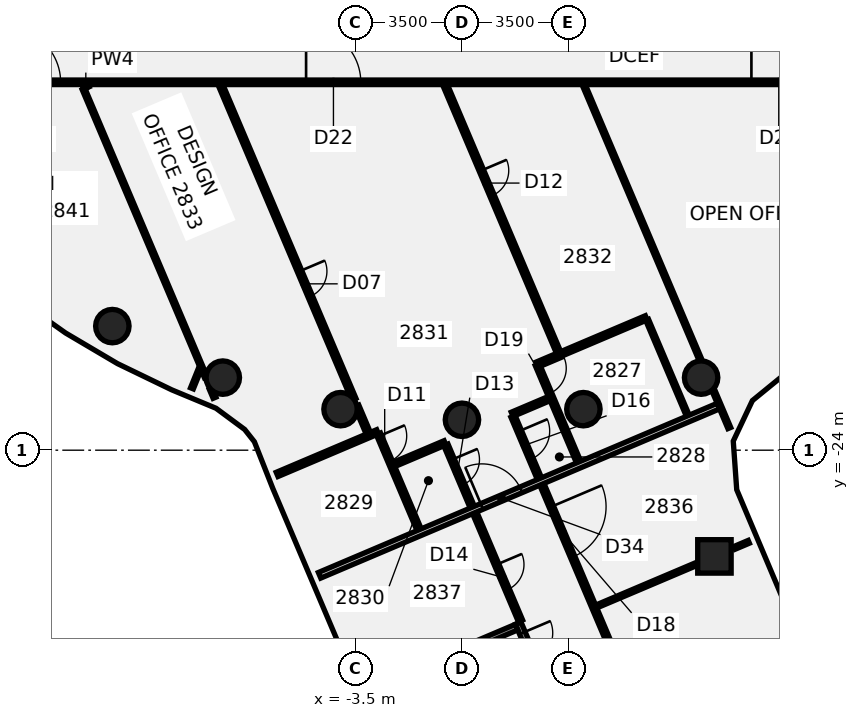
"""IFC4 building model, lengths in metres.
Left out: names, types, materials, properties, quantities, classifications, styles, units other than length and angle.
Written with IfcOpenShell. Run it as: python <this file> out.ifc"""

import sys

from ifc_helpers import new_model, si_unit, direction, frame, frame_2d, origin, origin_2d, place, context, subcontext, project, spatial, rectangle, circle, extrude, element, fill, save


model = new_model("IFC4")
c1 = context("Model", 3, precision=1e-05, world=origin(), true_north=direction((0.0, 1.0)))
c2 = subcontext(c1, "Body", "Model", "MODEL_VIEW")
j1 = project(units=[si_unit("LENGTHUNIT", "METRE"), si_unit("PLANEANGLEUNIT", "RADIAN")], contexts=[c1])
p1 = place(None, origin())
s1 = spatial("IfcSite", under=j1, at=p1, CompositionType="ELEMENT")
p2 = place(p1, origin())
s2 = spatial("IfcBuilding", under=s1, at=p2, CompositionType="ELEMENT")
p3 = place(p2, frame((0.0, 0.0, 117.25)))
s3 = spatial("IfcBuildingStorey", under=s2, at=p3, CompositionType="ELEMENT", Elevation=117.25)
for number, where, z_axis, x_axis in (
    (1, (-11.5, -19.919, -0.14), (0.0, 0.0, 1.0), (1.0, 0.0, 0.0)),
    (2, (-7.866, -21.613, -0.14), (0.0, 0.0, 1.0), (1.0, 0.0, 0.0)),
    (3, (-3.994, -22.651, -0.14), (0.0, 0.0, 1.0), (1.0, 0.0, 0.0)),
    (4, (0.0, -23.0, -0.14), (0.0, 0.0, 1.0), (1.0, 0.0, 0.0)),
    (5, (3.994, -22.651, -0.14), (0.0, 0.0, 1.0), (1.0, 0.0, 0.0)),
    (6, (7.866, -21.613, -0.14), (0.0, 0.0, 1.0), (1.0, 0.0, 0.0)),
):
    element("IfcColumn", number, at=place(p3, frame(where, z_axis=z_axis, x_axis=x_axis)), inside=s3, PredefinedType="COLUMN", context=c2, shape_type="SweptSolid", body=[
        extrude(circle(Radius=0.55, at=origin_2d()), origin(), (0.0, 0.0, 1.0), 3.75),
    ])
p4 = place(p3, frame((8.304, -27.493, -0.139), z_axis=(0.026355217637, 0.040541482933, 0.998830211129), x_axis=(-0.920521070145, -0.388633376935, 0.040063172014)))
e7 = element("IfcColumn", 7, at=p4, inside=s3, PredefinedType="COLUMN", context=c2, shape_type="SweptSolid", body=[
    extrude(rectangle(XDim=1.1, YDim=1.1, at=origin_2d()), origin(), (0.0, 0.0, 1.0), 3.752),
])
p5 = place(p3, frame((-12.445, -12.125, 0.0), z_axis=(0.0, 0.0, 1.0), x_axis=(0.390522443432, -0.920593407089, 0.0)))
e8 = element("IfcWall", 8, at=p5, inside=s3, PredefinedType="PARTITIONING", context=c2, shape_type="SweptSolid", body=[
    extrude(rectangle(XDim=10.296, YDim=0.1, at=frame_2d((5.148, 0.0))), origin(), (0.0, 0.0, 1.0), 3.01),
])
p6 = place(p3, frame((-8.264, -21.981, 0.0), z_axis=(0.0, 0.0, 1.0), x_axis=(0.390412497886, -0.920640039046, 0.0)))
e9 = element("IfcWall", 9, at=p6, inside=s3, PredefinedType="PARTITIONING", context=c2, shape_type="SweptSolid", body=[
    extrude(rectangle(XDim=0.32, YDim=0.1, at=frame_2d((0.16, 0.0))), origin(), (0.0, 0.0, 1.0), 3.01),
])
p7 = place(p3, frame((-7.94, -11.988, 0.0), z_axis=(0.0, 0.0, 1.0), x_axis=(0.390462727609, -0.920618736692, 0.0)))
e10 = element("IfcWall", 10, at=p7, inside=s3, PredefinedType="PARTITIONING", context=c2, shape_type="SweptSolid", body=[
    extrude(rectangle(XDim=11.227, YDim=0.15, at=frame_2d((5.614, 0.0))), origin(), (0.0, 0.0, 1.0), 3.01),
])
p8 = place(p7, frame((6.655, 0.0, 0.0)))
e11 = element("IfcOpeningElement", 11, at=p8, cuts=e10, PredefinedType="OPENING", context=c2, shape_type="SweptSolid", body=[
    extrude(rectangle(XDim=0.9, YDim=2.1, at=frame_2d((0.45, 1.05))), frame((0.0, 0.085, 0.0), z_axis=(0.0, -1.0, 0.0), x_axis=(1.0, 0.0, 0.0)), (0.0, 0.0, 1.0), 0.17),
])
p9 = place(p3, frame((-3.462, -22.545, 0.0), z_axis=(0.0, 0.0, 1.0), x_axis=(0.390504875404, -0.920600859377, 0.0)))
e12 = element("IfcWall", 12, at=p9, inside=s3, PredefinedType="PARTITIONING", context=c2, shape_type="SweptSolid", body=[
    extrude(rectangle(XDim=0.976, YDim=0.15, at=frame_2d((0.488, 0.0))), origin(), (0.0, 0.0, 1.0), 3.01),
])
p10 = place(p3, frame((-2.747, -23.464, 0.0), z_axis=(0.0, 0.0, 1.0), x_axis=(0.390509570778, -0.920598867657, 0.0)))
e13 = element("IfcWall", 13, at=p10, inside=s3, PredefinedType="PARTITIONING", context=c2, shape_type="SweptSolid", body=[
    extrude(rectangle(XDim=3.425, YDim=0.15, at=frame_2d((1.712, 0.0))), origin(), (0.0, 0.0, 1.0), 3.01),
])
p11 = place(p10, frame((0.075, 0.0, 0.0)))
e14 = element("IfcOpeningElement", 14, at=p11, cuts=e13, PredefinedType="OPENING", context=c2, shape_type="SweptSolid", body=[
    extrude(rectangle(XDim=0.9, YDim=2.1, at=frame_2d((0.45, 1.05))), frame((0.0, 0.085, 0.0), z_axis=(0.0, -1.0, 0.0), x_axis=(1.0, 0.0, 0.0)), (0.0, 0.0, 1.0), 0.17),
])
p12 = place(p3, frame((-0.554, -11.988, 0.0), z_axis=(0.0, 0.0, 1.0), x_axis=(0.390471755415, -0.920614907669, 0.0)))
e15 = element("IfcWall", 15, at=p12, inside=s3, PredefinedType="PARTITIONING", context=c2, shape_type="SweptSolid", body=[
    extrude(rectangle(XDim=9.554, YDim=0.15, at=frame_2d((4.777, 0.0))), origin(), (0.0, 0.0, 1.0), 3.01),
])
p13 = place(p12, frame((3.055, 0.0, 0.0)))
e16 = element("IfcOpeningElement", 16, at=p13, cuts=e15, PredefinedType="OPENING", context=c2, shape_type="SweptSolid", body=[
    extrude(rectangle(XDim=0.9, YDim=2.1, at=frame_2d((0.45, 1.05))), frame((0.0, 0.085, 0.0), z_axis=(0.0, -1.0, 0.0), x_axis=(1.0, 0.0, 0.0)), (0.0, 0.0, 1.0), 0.17),
])
p14 = place(p3, frame((-0.529, -23.826, 0.0), z_axis=(0.0, 0.0, 1.0), x_axis=(0.390377283155, -0.920654971635, 0.0)))
e17 = element("IfcWall", 17, at=p14, inside=s3, PredefinedType="PARTITIONING", context=c2, shape_type="SweptSolid", body=[
    extrude(rectangle(XDim=6.286, YDim=0.15, at=frame_2d((3.143, 0.0))), origin(), (0.0, 0.0, 1.0), 3.01),
])
p15 = place(p14, frame((0.525, 0.0, 0.0)))
e18 = element("IfcOpeningElement", 18, at=p15, cuts=e17, PredefinedType="OPENING", context=c2, shape_type="SweptSolid", body=[
    extrude(rectangle(XDim=0.9, YDim=2.1, at=frame_2d((0.45, 1.05))), frame((0.0, 0.085, 0.0), z_axis=(0.0, -1.0, 0.0), x_axis=(1.0, 0.0, 0.0)), (0.0, 0.0, 1.0), 0.17),
])
p16 = place(p14, frame((4.275, 0.0, 0.0)))
e19 = element("IfcOpeningElement", 19, at=p16, cuts=e17, PredefinedType="OPENING", context=c2, shape_type="SweptSolid", body=[
    extrude(rectangle(XDim=0.9, YDim=2.1, at=frame_2d((0.45, 1.05))), frame((0.0, 0.085, 0.0), z_axis=(0.0, -1.0, 0.0), x_axis=(1.0, 0.0, 0.0)), (0.0, 0.0, 1.0), 0.17),
])
p17 = place(p3, frame((1.68, -22.889, 0.0), z_axis=(0.0, 0.0, 1.0), x_axis=(0.390687971065, -0.920523171498, 0.0)))
e20 = element("IfcWall", 20, at=p17, inside=s3, PredefinedType="PARTITIONING", context=c2, shape_type="SweptSolid", body=[
    extrude(rectangle(XDim=15.75, YDim=0.15, at=frame_2d((7.875, 0.0))), origin(), (0.0, 0.0, 1.0), 3.01),
])
p18 = place(p17, frame((0.525, 0.0, 0.0)))
e21 = element("IfcOpeningElement", 21, at=p18, cuts=e20, PredefinedType="OPENING", context=c2, shape_type="SweptSolid", body=[
    extrude(rectangle(XDim=1.0, YDim=2.1, at=frame_2d((0.5, 1.05))), frame((0.0, 0.085, 0.0), z_axis=(0.0, -1.0, 0.0), x_axis=(1.0, 0.0, 0.0)), (0.0, 0.0, 1.0), 0.17),
])
p19 = place(p17, frame((12.075, 0.0, 0.0)))
e22 = element("IfcOpeningElement", 22, at=p19, cuts=e20, PredefinedType="OPENING", context=c2, shape_type="SweptSolid", body=[
    extrude(rectangle(XDim=0.9, YDim=2.1, at=frame_2d((0.45, 1.05))), frame((0.0, 0.085, 0.0), z_axis=(0.0, -1.0, 0.0), x_axis=(1.0, 0.0, 0.0)), (0.0, 0.0, 1.0), 0.17),
])
p20 = place(p17, frame((3.226, 0.0, 0.0)))
e23 = element("IfcOpeningElement", 23, at=p20, cuts=e20, PredefinedType="OPENING", context=c2, shape_type="SweptSolid", body=[
    extrude(rectangle(XDim=1.8, YDim=2.1, at=frame_2d((0.9, 1.05))), frame((0.0, 0.085, 0.0), z_axis=(0.0, -1.0, 0.0), x_axis=(1.0, 0.0, 0.0)), (0.0, 0.0, 1.0), 0.17),
])
p21 = place(p3, frame((2.48, -21.188, 0.0), z_axis=(0.0, 0.0, 1.0), x_axis=(0.390054258105, -0.920791874277, 0.0)))
e24 = element("IfcWall", 24, at=p21, inside=s3, PredefinedType="PARTITIONING", context=c2, shape_type="SweptSolid", body=[
    extrude(rectangle(XDim=3.479, YDim=0.15, at=frame_2d((1.74, 0.0))), origin(), (0.0, 0.0, 1.0), 3.01),
])
p22 = place(p21, frame((0.13, 0.0, 0.0)))
e25 = element("IfcOpeningElement", 25, at=p22, cuts=e24, PredefinedType="OPENING", context=c2, shape_type="SweptSolid", body=[
    extrude(rectangle(XDim=0.9, YDim=2.1, at=frame_2d((0.45, 1.05))), frame((0.0, 0.085, 0.0), z_axis=(0.0, -1.0, 0.0), x_axis=(1.0, 0.0, 0.0)), (0.0, 0.0, 1.0), 0.17),
])
p23 = place(p3, frame((4.004, -11.978, 0.0), z_axis=(0.0, 0.0, 1.0), x_axis=(0.390495164952, -0.920604978342, 0.0)))
e26 = element("IfcWall", 26, at=p23, inside=s3, PredefinedType="PARTITIONING", context=c2, shape_type="SweptSolid", body=[
    extrude(rectangle(XDim=9.861, YDim=0.1, at=frame_2d((4.93, 0.0))), origin(), (0.0, 0.0, 1.0), 3.01),
])
p24 = place(p3, frame((8.252, -21.992, 0.0), z_axis=(0.0, 0.0, 1.0), x_axis=(0.390522765708, -0.920593270377, 0.0)))
e27 = element("IfcWall", 27, at=p24, inside=s3, PredefinedType="PARTITIONING", context=c2, shape_type="SweptSolid", body=[
    extrude(rectangle(XDim=1.389, YDim=0.1, at=frame_2d((0.695, 0.0))), origin(), (0.0, 0.0, 1.0), 3.01),
])
p25 = place(p3, frame((6.091, -19.715, 0.0), z_axis=(0.0, 0.0, 1.0), x_axis=(0.390573680368, -0.920571670324, 0.0)))
e28 = element("IfcWall", 28, at=p25, inside=s3, PredefinedType="PARTITIONING", context=c2, shape_type="SweptSolid", body=[
    extrude(rectangle(XDim=3.42, YDim=0.1, at=frame_2d((1.71, 0.0))), origin(), (0.0, 0.0, 1.0), 3.01),
])
p26 = place(p3, frame((-17.1, -11.9, 0.0), z_axis=(0.0, 0.0, 1.0), x_axis=(1.0, 0.0, 0.0)))
e29 = element("IfcWall", 29, at=p26, inside=s3, PredefinedType="PARTITIONING", context=c2, shape_type="SweptSolid", body=[
    extrude(rectangle(XDim=34.165, YDim=0.15, at=frame_2d((17.083, 0.0))), origin(), (0.0, 0.0, 1.0), 3.01),
])
p27 = place(p26, frame((11.973, 0.0, 0.0)))
e30 = element("IfcOpeningElement", 30, at=p27, cuts=e29, PredefinedType="OPENING", context=c2, shape_type="SweptSolid", body=[
    extrude(rectangle(XDim=1.8, YDim=2.1, at=frame_2d((0.9, 1.05))), frame((0.0, 0.085, 0.0), z_axis=(0.0, -1.0, 0.0), x_axis=(1.0, 0.0, 0.0)), (0.0, 0.0, 1.0), 0.17),
])
p28 = place(p26, frame((2.1, 0.0, 0.0)))
e31 = element("IfcOpeningElement", 31, at=p28, cuts=e29, PredefinedType="OPENING", context=c2, shape_type="SweptSolid", body=[
    extrude(rectangle(XDim=1.8, YDim=2.1, at=frame_2d((0.9, 1.05))), frame((0.0, 0.085, 0.0), z_axis=(0.0, -1.0, 0.0), x_axis=(1.0, 0.0, 0.0)), (0.0, 0.0, 1.0), 0.17),
])
p29 = place(p26, frame((26.621, 0.0, 0.0)))
e32 = element("IfcOpeningElement", 32, at=p29, cuts=e29, PredefinedType="OPENING", context=c2, shape_type="SweptSolid", body=[
    extrude(rectangle(XDim=1.8, YDim=2.1, at=frame_2d((0.9, 1.05))), frame((0.0, 0.085, 0.0), z_axis=(0.0, -1.0, 0.0), x_axis=(1.0, 0.0, 0.0)), (0.0, 0.0, 1.0), 0.17),
])
p30 = place(p3, frame((-12.464, -12.079, 0.0), z_axis=(0.0, 0.0, 1.0), x_axis=(0.920595118878, 0.390518408141, 0.0)))
e33 = element("IfcWall", 33, at=p30, inside=s3, PredefinedType="PARTITIONING", context=c2, shape_type="SweptSolid", body=[
    extrude(rectangle(XDim=0.199, YDim=0.1, at=frame_2d((0.1, 0.0))), origin(), (0.0, 0.0, 1.0), 3.01),
])
p31 = place(p3, frame((-6.08, -24.797, 0.0), z_axis=(0.0, 0.0, 1.0), x_axis=(0.920598825998, 0.390509668986, 0.0)))
e34 = element("IfcWall", 34, at=p31, inside=s3, PredefinedType="PARTITIONING", context=c2, shape_type="SweptSolid", body=[
    extrude(rectangle(XDim=3.589, YDim=0.15, at=frame_2d((1.794, 0.0))), origin(), (0.0, 0.0, 1.0), 3.01),
])
p32 = place(p3, frame((2.472, -21.169, 0.0), z_axis=(0.0, 0.0, 1.0), x_axis=(0.920615200633, 0.390471064695, 0.0)))
e35 = element("IfcWall", 35, at=p32, inside=s3, PredefinedType="PARTITIONING", context=c2, shape_type="SweptSolid", body=[
    extrude(rectangle(XDim=3.9, YDim=0.15, at=frame_2d((1.95, 0.0))), origin(), (0.0, 0.0, 1.0), 3.01),
])
p33 = place(p3, frame((-4.683, -28.115, 0.0), z_axis=(0.0, 0.0, 1.0), x_axis=(0.920579915117, 0.390554247044, 0.0)))
e36 = element("IfcWall", 36, at=p33, inside=s3, PredefinedType="PARTITIONING", context=c2, shape_type="SweptSolid", body=[
    extrude(rectangle(XDim=14.249, YDim=0.2, at=frame_2d((7.125, 0.0))), origin(), (0.0, 0.0, 1.0), 3.01),
])
p34 = place(p33, frame((5.799, 0.0, 0.0)))
e37 = element("IfcOpeningElement", 37, at=p34, cuts=e36, PredefinedType="OPENING", context=c2, shape_type="SweptSolid", body=[
    extrude(rectangle(XDim=1.4, YDim=2.1, at=frame_2d((0.7, 1.05))), frame((0.0, 0.11, 0.0), z_axis=(0.0, -1.0, 0.0), x_axis=(1.0, 0.0, 0.0)), (0.0, 0.0, 1.0), 0.22),
])
p35 = place(p3, frame((-2.238, -24.47, 0.0), z_axis=(0.0, 0.0, 1.0), x_axis=(0.920591984812, 0.390525796202, 0.0)))
e38 = element("IfcWall", 38, at=p35, inside=s3, PredefinedType="PARTITIONING", context=c2, shape_type="SweptSolid", body=[
    extrude(rectangle(XDim=1.825, YDim=0.15, at=frame_2d((0.913, 0.0))), origin(), (0.0, 0.0, 1.0), 3.01),
])
p36 = place(p3, frame((1.651, -22.82, 0.0), z_axis=(0.0, 0.0, 1.0), x_axis=(0.920615907856, 0.390469397267, 0.0)))
e39 = element("IfcWall", 39, at=p36, inside=s3, PredefinedType="PARTITIONING", context=c2, shape_type="SweptSolid", body=[
    extrude(rectangle(XDim=1.325, YDim=0.15, at=frame_2d((0.663, 0.0))), origin(), (0.0, 0.0, 1.0), 3.01),
])
p37 = place(p3, frame((4.42, -29.141, 0.0), z_axis=(0.0, 0.0, 1.0), x_axis=(0.920601541883, 0.390503266416, 0.0)))
e40 = element("IfcWall", 40, at=p37, inside=s3, PredefinedType="PARTITIONING", context=c2, shape_type="SweptSolid", body=[
    extrude(rectangle(XDim=3.634, YDim=0.1, at=frame_2d((1.817, 0.0))), origin(), (0.0, 0.0, 1.0), 3.01),
])
p38 = place(p3, frame((8.969, -27.211, 0.0), z_axis=(0.0, 0.0, 1.0), x_axis=(0.920660619586, 0.390363962917, 0.0)))
e41 = element("IfcWall", 41, at=p38, inside=s3, PredefinedType="PARTITIONING", context=c2, shape_type="SweptSolid", body=[
    extrude(rectangle(XDim=0.506, YDim=0.1, at=frame_2d((0.253, 0.0))), origin(), (0.0, 0.0, 1.0), 3.01),
])
p39 = place(p3, frame((-8.882, -21.966, 0.0), z_axis=(0.0, 0.0, 1.0), x_axis=(0.375077906677, 0.926993292275, 0.0)))
e42 = element("IfcWall", 42, at=p39, inside=s3, PredefinedType="PARTITIONING", context=c2, shape_type="SweptSolid", body=[
    extrude(rectangle(XDim=0.696, YDim=0.1, at=frame_2d((0.348, 0.0))), origin(), (0.0, 0.0, 1.0), 3.01),
])
p40 = place(p3, frame((1.849, -29.688, -0.14), z_axis=(0.0, 0.0, 1.0), x_axis=(0.390517094017, -0.920595676332, 0.0)))
e43 = element("IfcWall", 43, at=p40, inside=s3, PredefinedType="SHEAR", context=c2, shape_type="SweptSolid", body=[
    extrude(rectangle(XDim=6.7, YDim=0.2, at=frame_2d((3.35, 0.0))), origin(), (0.0, 0.0, 1.0), 3.15),
])
p41 = place(p40, frame((0.35, 0.0, 0.0)))
e44 = element("IfcOpeningElement", 44, at=p41, cuts=e43, PredefinedType="OPENING", context=c2, shape_type="SweptSolid", body=[
    extrude(rectangle(XDim=1.0, YDim=2.1, at=frame_2d((0.5, 1.05))), frame((0.0, 0.11, 0.0), z_axis=(0.0, -1.0, 0.0), x_axis=(1.0, 0.0, 0.0)), (0.0, 0.0, 1.0), 0.22),
])
p42 = place(p3, frame((-1.15, -31.069, -0.14), z_axis=(0.0, 0.0, 1.0), x_axis=(0.920618350613, 0.390463637891, 0.0)))
e45 = element("IfcWall", 45, at=p42, inside=s3, PredefinedType="SHEAR", context=c2, shape_type="SweptSolid", body=[
    extrude(rectangle(XDim=3.2, YDim=0.2, at=frame_2d((1.6, 0.0))), origin(), (0.0, 0.0, 1.0), 3.15),
])
p43 = place(p8, frame((0.9, 0.0, 0.0), z_axis=(0.0, 0.0, 1.0), x_axis=(-1.0, 0.0, 0.0)))
e46 = element("IfcDoor", 46, at=p43, inside=s3, OperationType="SINGLE_SWING_RIGHT", PredefinedType="DOOR", context=c2, shape_type="SweptSolid", body=[
    extrude(rectangle(XDim=0.9, YDim=2.1, at=frame_2d((0.45, 1.05))), frame((0.0, 0.025, 0.0), z_axis=(0.0, -1.0, 0.0), x_axis=(1.0, 0.0, 0.0)), (0.0, 0.0, 1.0), 0.05),
])
fill(e11, e46)
p44 = place(p11, frame((0.9, 0.0, 0.0), z_axis=(0.0, 0.0, 1.0), x_axis=(-1.0, 0.0, 0.0)))
e47 = element("IfcDoor", 47, at=p44, inside=s3, OperationType="SINGLE_SWING_LEFT", PredefinedType="DOOR", context=c2, shape_type="SweptSolid", body=[
    extrude(rectangle(XDim=0.9, YDim=2.1, at=frame_2d((0.45, 1.05))), frame((0.0, 0.025, 0.0), z_axis=(0.0, -1.0, 0.0), x_axis=(1.0, 0.0, 0.0)), (0.0, 0.0, 1.0), 0.05),
])
fill(e14, e47)
p45 = place(p13, origin())
e48 = element("IfcDoor", 48, at=p45, inside=s3, OperationType="SINGLE_SWING_RIGHT", PredefinedType="DOOR", context=c2, shape_type="SweptSolid", body=[
    extrude(rectangle(XDim=0.9, YDim=2.1, at=frame_2d((0.45, 1.05))), frame((0.0, 0.025, 0.0), z_axis=(0.0, -1.0, 0.0), x_axis=(1.0, 0.0, 0.0)), (0.0, 0.0, 1.0), 0.05),
])
fill(e16, e48)
p46 = place(p15, frame((0.9, 0.0, 0.0), z_axis=(0.0, 0.0, 1.0), x_axis=(-1.0, 0.0, 0.0)))
e49 = element("IfcDoor", 49, at=p46, inside=s3, OperationType="SINGLE_SWING_LEFT", PredefinedType="DOOR", context=c2, shape_type="SweptSolid", body=[
    extrude(rectangle(XDim=0.9, YDim=2.1, at=frame_2d((0.45, 1.05))), frame((0.0, 0.025, 0.0), z_axis=(0.0, -1.0, 0.0), x_axis=(1.0, 0.0, 0.0)), (0.0, 0.0, 1.0), 0.05),
])
fill(e18, e49)
p47 = place(p16, frame((0.9, 0.0, 0.0), z_axis=(0.0, 0.0, 1.0), x_axis=(-1.0, 0.0, 0.0)))
e50 = element("IfcDoor", 50, at=p47, inside=s3, OperationType="SINGLE_SWING_RIGHT", PredefinedType="DOOR", context=c2, shape_type="SweptSolid", body=[
    extrude(rectangle(XDim=0.9, YDim=2.1, at=frame_2d((0.45, 1.05))), frame((0.0, 0.025, 0.0), z_axis=(0.0, -1.0, 0.0), x_axis=(1.0, 0.0, 0.0)), (0.0, 0.0, 1.0), 0.05),
])
fill(e19, e50)
p48 = place(p18, origin())
e51 = element("IfcDoor", 51, at=p48, inside=s3, OperationType="SINGLE_SWING_RIGHT", PredefinedType="DOOR", context=c2, shape_type="SweptSolid", body=[
    extrude(rectangle(XDim=1.0, YDim=2.1, at=frame_2d((0.5, 1.05))), frame((0.0, 0.025, 0.0), z_axis=(0.0, -1.0, 0.0), x_axis=(1.0, 0.0, 0.0)), (0.0, 0.0, 1.0), 0.05),
])
fill(e21, e51)
p49 = place(p20, origin())
e52 = element("IfcDoor", 52, at=p49, inside=s3, OperationType="DOUBLE_DOOR_SINGLE_SWING", PredefinedType="DOOR", context=c2, shape_type="SweptSolid", body=[
    extrude(rectangle(XDim=1.8, YDim=2.1, at=frame_2d((0.9, 1.05))), frame((0.0, 0.025, 0.0), z_axis=(0.0, -1.0, 0.0), x_axis=(1.0, 0.0, 0.0)), (0.0, 0.0, 1.0), 0.05),
])
fill(e23, e52)
p50 = place(p22, origin())
e53 = element("IfcDoor", 53, at=p50, inside=s3, OperationType="SINGLE_SWING_RIGHT", PredefinedType="DOOR", context=c2, shape_type="SweptSolid", body=[
    extrude(rectangle(XDim=0.9, YDim=2.1, at=frame_2d((0.45, 1.05))), frame((0.0, 0.025, 0.0), z_axis=(0.0, -1.0, 0.0), x_axis=(1.0, 0.0, 0.0)), (0.0, 0.0, 1.0), 0.05),
])
fill(e25, e53)
p51 = place(p27, origin())
e54 = element("IfcDoor", 54, at=p51, inside=s3, OperationType="DOUBLE_DOOR_SINGLE_SWING", PredefinedType="DOOR", context=c2, shape_type="SweptSolid", body=[
    extrude(rectangle(XDim=1.8, YDim=2.1, at=frame_2d((0.9, 1.05))), frame((0.0, 0.025, 0.0), z_axis=(0.0, -1.0, 0.0), x_axis=(1.0, 0.0, 0.0)), (0.0, 0.0, 1.0), 0.05),
])
fill(e30, e54)
p52 = place(p28, frame((1.8, 0.0, 0.0), z_axis=(0.0, 0.0, 1.0), x_axis=(-1.0, 0.0, 0.0)))
e55 = element("IfcDoor", 55, at=p52, inside=s3, OperationType="DOUBLE_DOOR_SINGLE_SWING", PredefinedType="DOOR", context=c2, shape_type="SweptSolid", body=[
    extrude(rectangle(XDim=1.8, YDim=2.1, at=frame_2d((0.9, 1.05))), frame((0.0, 0.025, 0.0), z_axis=(0.0, -1.0, 0.0), x_axis=(1.0, 0.0, 0.0)), (0.0, 0.0, 1.0), 0.05),
])
fill(e31, e55)
p53 = place(p29, frame((1.8, 0.0, 0.0), z_axis=(0.0, 0.0, 1.0), x_axis=(-1.0, 0.0, 0.0)))
e56 = element("IfcDoor", 56, at=p53, inside=s3, OperationType="DOUBLE_DOOR_SINGLE_SWING", PredefinedType="DOOR", context=c2, shape_type="SweptSolid", body=[
    extrude(rectangle(XDim=1.8, YDim=2.1, at=frame_2d((0.9, 1.05))), frame((0.0, 0.025, 0.0), z_axis=(0.0, -1.0, 0.0), x_axis=(1.0, 0.0, 0.0)), (0.0, 0.0, 1.0), 0.05),
])
fill(e32, e56)
p54 = place(p34, origin())
e57 = element("IfcDoor", 57, at=p54, inside=s3, OperationType="DOUBLE_DOOR_SINGLE_SWING", PredefinedType="DOOR", context=c2, shape_type="SweptSolid", body=[
    extrude(rectangle(XDim=1.4, YDim=2.1, at=frame_2d((0.7, 1.05))), frame((0.0, 0.025, 0.0), z_axis=(0.0, -1.0, 0.0), x_axis=(1.0, 0.0, 0.0)), (0.0, 0.0, 1.0), 0.05),
])
fill(e37, e57)
p55 = place(p41, origin())
e58 = element("IfcDoor", 58, at=p55, inside=s3, OperationType="SINGLE_SWING_LEFT", PredefinedType="DOOR", context=c2, shape_type="SweptSolid", body=[
    extrude(rectangle(XDim=1.0, YDim=2.1, at=frame_2d((0.5, 1.05))), frame((0.0, 0.025, 0.0), z_axis=(0.0, -1.0, 0.0), x_axis=(1.0, 0.0, 0.0)), (0.0, 0.0, 1.0), 0.05),
])
fill(e44, e58)
save(model, sys.argv[1])
